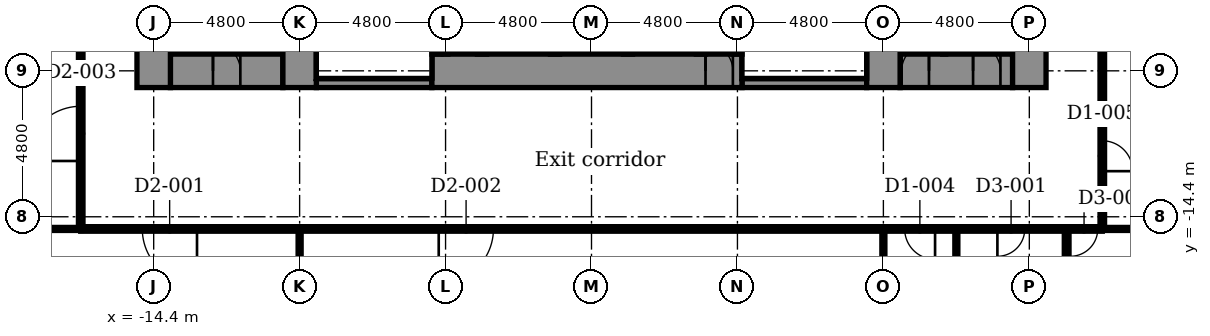
"""IFC4 building model, lengths in metres.
Left out: names, types, materials, properties, quantities, classifications, styles, units other than length and angle.
Written with IfcOpenShell. Run it as: python <this file> out.ifc"""

import sys

from ifc_helpers import new_model, si_unit, direction, frame, frame_2d, origin, place, context, subcontext, project, spatial, rectangle, extrude, element, fill, save


model = new_model("IFC4")
c1 = context("Model", 3, precision=1e-05, world=origin(), true_north=direction((0.0, 1.0)))
c2 = subcontext(c1, "Body", "Model", "MODEL_VIEW")
j1 = project(units=[si_unit("LENGTHUNIT", "METRE"), si_unit("PLANEANGLEUNIT", "RADIAN")], contexts=[c1])
p1 = place(None, origin())
s1 = spatial("IfcSite", under=j1, at=p1, CompositionType="ELEMENT")
p2 = place(p1, origin())
s2 = spatial("IfcBuilding", under=s1, at=p2, CompositionType="ELEMENT")
p3 = place(p2, origin())
s3 = spatial("IfcBuildingStorey", under=s2, at=p3, CompositionType="ELEMENT", Elevation=0.0)
p4 = place(p3, frame((-9.05, -10.0, -0.4), z_axis=(0.0, 0.0, 1.0), x_axis=(1.0, 0.0, 0.0)))
e1 = element("IfcWall", 1, at=p4, inside=s3, PredefinedType="STANDARD", context=c2, shape_type="SweptSolid", body=[
    extrude(rectangle(XDim=3.8, YDim=0.3, at=frame_2d((1.9, 0.0))), origin(), (0.0, 0.0, 1.0), 7.1),
])
p5 = place(p3, frame((4.95, -10.0, -0.4), z_axis=(0.0, 0.0, 1.0), x_axis=(1.0, 0.0, 0.0)))
e2 = element("IfcWall", 2, at=p5, inside=s3, PredefinedType="STANDARD", context=c2, shape_type="SweptSolid", body=[
    extrude(rectangle(XDim=4.1, YDim=0.3, at=frame_2d((2.05, 0.0))), origin(), (0.0, 0.0, 1.0), 7.1),
])
p6 = place(p3, frame((-13.85, -9.6, -0.4), z_axis=(0.0, 0.0, 1.0), x_axis=(1.0, 0.0, 0.0)))
e3 = element("IfcWall", 3, at=p6, inside=s3, PredefinedType="SHEAR", context=c2, shape_type="SweptSolid", body=[
    extrude(rectangle(XDim=3.7, YDim=1.1, at=frame_2d((1.85, 0.0))), origin(), (0.0, 0.0, 1.0), 7.1),
])
p7 = place(p6, frame((1.4, 0.0, 0.4)))
e4 = element("IfcOpeningElement", 4, at=p7, cuts=e3, PredefinedType="OPENING", context=c2, shape_type="SweptSolid", body=[
    extrude(rectangle(XDim=0.9, YDim=2.1, at=frame_2d((0.45, 1.05))), frame((0.0, 0.56, 0.0), z_axis=(0.0, -1.0, 0.0), x_axis=(1.0, 0.0, 0.0)), (0.0, 0.0, 1.0), 1.12),
])
p8 = place(p3, frame((-5.25, -9.6, -0.4), z_axis=(0.0, 0.0, 1.0), x_axis=(1.0, 0.0, 0.0)))
e5 = element("IfcWall", 5, at=p8, inside=s3, PredefinedType="SHEAR", context=c2, shape_type="SweptSolid", body=[
    extrude(rectangle(XDim=10.2, YDim=1.1, at=frame_2d((5.1, 0.0))), origin(), (0.0, 0.0, 1.0), 7.1),
])
p9 = place(p8, frame((9.0, 0.0, 0.4)))
e6 = element("IfcOpeningElement", 6, at=p9, cuts=e5, PredefinedType="OPENING", context=c2, shape_type="SweptSolid", body=[
    extrude(rectangle(XDim=0.9, YDim=2.1, at=frame_2d((0.45, 1.05))), frame((0.0, 0.56, 0.0), z_axis=(0.0, -1.0, 0.0), x_axis=(1.0, 0.0, 0.0)), (0.0, 0.0, 1.0), 1.12),
])
p10 = place(p3, frame((10.15, -9.6, -0.4), z_axis=(0.0, 0.0, 1.0), x_axis=(1.0, 0.0, 0.0)))
e7 = element("IfcWall", 7, at=p10, inside=s3, PredefinedType="SHEAR", context=c2, shape_type="SweptSolid", body=[
    extrude(rectangle(XDim=3.7, YDim=1.1, at=frame_2d((1.85, 0.0))), origin(), (0.0, 0.0, 1.0), 7.1),
])
p11 = place(p10, frame((0.05, 0.0, 0.4)))
e8 = element("IfcOpeningElement", 8, at=p11, cuts=e7, PredefinedType="OPENING", context=c2, shape_type="SweptSolid", body=[
    extrude(rectangle(XDim=0.9, YDim=2.1, at=frame_2d((0.45, 1.05))), frame((0.0, 0.56, 0.0), z_axis=(0.0, -1.0, 0.0), x_axis=(1.0, 0.0, 0.0)), (0.0, 0.0, 1.0), 1.12),
])
p12 = place(p10, frame((2.4, 0.0, 0.4)))
e9 = element("IfcOpeningElement", 9, at=p12, cuts=e7, PredefinedType="OPENING", context=c2, shape_type="SweptSolid", body=[
    extrude(rectangle(XDim=0.9, YDim=2.1, at=frame_2d((0.45, 1.05))), frame((0.0, 0.56, 0.0), z_axis=(0.0, -1.0, 0.0), x_axis=(1.0, 0.0, 0.0)), (0.0, 0.0, 1.0), 1.12),
])
p13 = place(p3, frame((-14.4, -10.15, -0.4), z_axis=(0.0, 0.0, 1.0), x_axis=(0.0, 1.0, 0.0)))
e10 = element("IfcWall", 10, at=p13, inside=s3, PredefinedType="SHEAR", context=c2, shape_type="SweptSolid", body=[
    extrude(rectangle(XDim=20.3, YDim=1.1, at=frame_2d((10.15, 0.0))), origin(), (0.0, 0.0, 1.0), 7.1),
])
p14 = place(p13, frame((3.6, 0.0, 0.4)))
e11 = element("IfcOpeningElement", 11, at=p14, cuts=e10, PredefinedType="OPENING", context=c2, shape_type="SweptSolid", body=[
    extrude(rectangle(XDim=1.1, YDim=2.1, at=frame_2d((0.55, 1.05))), frame((0.0, 0.56, 0.0), z_axis=(0.0, -1.0, 0.0), x_axis=(1.0, 0.0, 0.0)), (0.0, 0.0, 1.0), 1.12),
])
p15 = place(p13, frame((6.0, 0.0, 0.4)))
e12 = element("IfcOpeningElement", 12, at=p15, cuts=e10, PredefinedType="OPENING", context=c2, shape_type="SweptSolid", body=[
    extrude(rectangle(XDim=1.1, YDim=2.1, at=frame_2d((0.55, 1.05))), frame((0.0, 0.56, 0.0), z_axis=(0.0, -1.0, 0.0), x_axis=(1.0, 0.0, 0.0)), (0.0, 0.0, 1.0), 1.12),
])
p16 = place(p13, frame((8.4, 0.0, 0.4)))
e13 = element("IfcOpeningElement", 13, at=p16, cuts=e10, PredefinedType="OPENING", context=c2, shape_type="SweptSolid", body=[
    extrude(rectangle(XDim=1.1, YDim=2.1, at=frame_2d((0.55, 1.05))), frame((0.0, 0.56, 0.0), z_axis=(0.0, -1.0, 0.0), x_axis=(1.0, 0.0, 0.0)), (0.0, 0.0, 1.0), 1.12),
])
p17 = place(p13, frame((10.8, 0.0, 0.4)))
e14 = element("IfcOpeningElement", 14, at=p17, cuts=e10, PredefinedType="OPENING", context=c2, shape_type="SweptSolid", body=[
    extrude(rectangle(XDim=1.1, YDim=2.1, at=frame_2d((0.55, 1.05))), frame((0.0, 0.56, 0.0), z_axis=(0.0, -1.0, 0.0), x_axis=(1.0, 0.0, 0.0)), (0.0, 0.0, 1.0), 1.12),
])
p18 = place(p13, frame((13.2, 0.0, 0.4)))
e15 = element("IfcOpeningElement", 15, at=p18, cuts=e10, PredefinedType="OPENING", context=c2, shape_type="SweptSolid", body=[
    extrude(rectangle(XDim=1.1, YDim=2.1, at=frame_2d((0.55, 1.05))), frame((0.0, 0.56, 0.0), z_axis=(0.0, -1.0, 0.0), x_axis=(1.0, 0.0, 0.0)), (0.0, 0.0, 1.0), 1.12),
])
p19 = place(p13, frame((15.6, 0.0, 0.4)))
e16 = element("IfcOpeningElement", 16, at=p19, cuts=e10, PredefinedType="OPENING", context=c2, shape_type="SweptSolid", body=[
    extrude(rectangle(XDim=1.1, YDim=2.1, at=frame_2d((0.55, 1.05))), frame((0.0, 0.56, 0.0), z_axis=(0.0, -1.0, 0.0), x_axis=(1.0, 0.0, 0.0)), (0.0, 0.0, 1.0), 1.12),
])
p20 = place(p3, frame((-9.6, -10.15, -0.4), z_axis=(0.0, 0.0, 1.0), x_axis=(0.0, 1.0, 0.0)))
e17 = element("IfcWall", 17, at=p20, inside=s3, PredefinedType="SHEAR", context=c2, shape_type="SweptSolid", body=[
    extrude(rectangle(XDim=7.6, YDim=1.1, at=frame_2d((3.8, 0.0))), origin(), (0.0, 0.0, 1.0), 7.1),
])
p21 = place(p3, frame((-5.1, -9.05, -0.4), z_axis=(0.0, 0.0, 1.0), x_axis=(0.0, 1.0, 0.0)))
e18 = element("IfcWall", 18, at=p21, inside=s3, PredefinedType="STANDARD", context=c2, shape_type="SweptSolid", body=[
    extrude(rectangle(XDim=6.8, YDim=0.3, at=frame_2d((3.4, 0.0))), origin(), (0.0, 0.0, 1.0), 7.1),
])
p22 = place(p21, frame((3.6, 0.0, 0.4)))
e19 = element("IfcOpeningElement", 19, at=p22, cuts=e18, PredefinedType="OPENING", context=c2, shape_type="SweptSolid", body=[
    extrude(rectangle(XDim=1.2, YDim=2.1, at=frame_2d((0.6, 1.05))), frame((0.0, 0.16, 0.0), z_axis=(0.0, -1.0, 0.0), x_axis=(1.0, 0.0, 0.0)), (0.0, 0.0, 1.0), 0.32),
])
for number, where, z_axis, x_axis in (
    (20, (-3.6, -9.05, -0.4), (0.0, 0.0, 1.0), (0.0, 1.0, 0.0)),
    (21, (-1.2, -9.05, -0.4), (0.0, 0.0, 1.0), (0.0, 1.0, 0.0)),
    (22, (1.2, -9.05, -0.4), (0.0, 0.0, 1.0), (0.0, 1.0, 0.0)),
    (23, (3.6, -9.05, -0.4), (0.0, 0.0, 1.0), (0.0, 1.0, 0.0)),
):
    element("IfcWall", number, at=place(p3, frame(where, z_axis=z_axis, x_axis=x_axis)), inside=s3, PredefinedType="STANDARD", context=c2, shape_type="SweptSolid", body=[
        extrude(rectangle(XDim=3.2, YDim=0.3, at=frame_2d((1.6, 0.0))), origin(), (0.0, 0.0, 1.0), 7.1),
    ])
p23 = place(p3, frame((4.8, -9.05, -0.4), z_axis=(0.0, 0.0, 1.0), x_axis=(0.0, 1.0, 0.0)))
e24 = element("IfcWall", 24, at=p23, inside=s3, PredefinedType="STANDARD", context=c2, shape_type="SweptSolid", body=[
    extrude(rectangle(XDim=6.8, YDim=0.3, at=frame_2d((3.4, 0.0))), origin(), (0.0, 0.0, 1.0), 7.1),
])
p24 = place(p23, frame((3.6, 0.0, 0.4)))
e25 = element("IfcOpeningElement", 25, at=p24, cuts=e24, PredefinedType="OPENING", context=c2, shape_type="SweptSolid", body=[
    extrude(rectangle(XDim=1.2, YDim=2.1, at=frame_2d((0.6, 1.05))), frame((0.0, 0.16, 0.0), z_axis=(0.0, -1.0, 0.0), x_axis=(1.0, 0.0, 0.0)), (0.0, 0.0, 1.0), 0.32),
])
p25 = place(p3, frame((9.6, -10.15, -0.4), z_axis=(0.0, 0.0, 1.0), x_axis=(0.0, 1.0, 0.0)))
e26 = element("IfcWall", 26, at=p25, inside=s3, PredefinedType="SHEAR", context=c2, shape_type="SweptSolid", body=[
    extrude(rectangle(XDim=20.3, YDim=1.1, at=frame_2d((10.15, 0.0))), origin(), (0.0, 0.0, 1.0), 7.1),
])
p26 = place(p3, frame((14.4, -10.15, -0.4), z_axis=(0.0, 0.0, 1.0), x_axis=(0.0, 1.0, 0.0)))
e27 = element("IfcWall", 27, at=p26, inside=s3, PredefinedType="SHEAR", context=c2, shape_type="SweptSolid", body=[
    extrude(rectangle(XDim=20.3, YDim=1.1, at=frame_2d((10.15, 0.0))), origin(), (0.0, 0.0, 1.0), 7.1),
])
p27 = place(p26, frame((3.6, 0.0, 0.4)))
e28 = element("IfcOpeningElement", 28, at=p27, cuts=e27, PredefinedType="OPENING", context=c2, shape_type="SweptSolid", body=[
    extrude(rectangle(XDim=1.1, YDim=2.1, at=frame_2d((0.55, 1.05))), frame((0.0, 0.56, 0.0), z_axis=(0.0, -1.0, 0.0), x_axis=(1.0, 0.0, 0.0)), (0.0, 0.0, 1.0), 1.12),
])
p28 = place(p26, frame((6.0, 0.0, 0.4)))
e29 = element("IfcOpeningElement", 29, at=p28, cuts=e27, PredefinedType="OPENING", context=c2, shape_type="SweptSolid", body=[
    extrude(rectangle(XDim=1.1, YDim=2.1, at=frame_2d((0.55, 1.05))), frame((0.0, 0.56, 0.0), z_axis=(0.0, -1.0, 0.0), x_axis=(1.0, 0.0, 0.0)), (0.0, 0.0, 1.0), 1.12),
])
p29 = place(p26, frame((8.4, 0.0, 0.4)))
e30 = element("IfcOpeningElement", 30, at=p29, cuts=e27, PredefinedType="OPENING", context=c2, shape_type="SweptSolid", body=[
    extrude(rectangle(XDim=1.1, YDim=2.1, at=frame_2d((0.55, 1.05))), frame((0.0, 0.56, 0.0), z_axis=(0.0, -1.0, 0.0), x_axis=(1.0, 0.0, 0.0)), (0.0, 0.0, 1.0), 1.12),
])
p30 = place(p26, frame((10.8, 0.0, 0.4)))
e31 = element("IfcOpeningElement", 31, at=p30, cuts=e27, PredefinedType="OPENING", context=c2, shape_type="SweptSolid", body=[
    extrude(rectangle(XDim=1.1, YDim=2.1, at=frame_2d((0.55, 1.05))), frame((0.0, 0.56, 0.0), z_axis=(0.0, -1.0, 0.0), x_axis=(1.0, 0.0, 0.0)), (0.0, 0.0, 1.0), 1.12),
])
p31 = place(p26, frame((13.2, 0.0, 0.4)))
e32 = element("IfcOpeningElement", 32, at=p31, cuts=e27, PredefinedType="OPENING", context=c2, shape_type="SweptSolid", body=[
    extrude(rectangle(XDim=1.1, YDim=2.1, at=frame_2d((0.55, 1.05))), frame((0.0, 0.56, 0.0), z_axis=(0.0, -1.0, 0.0), x_axis=(1.0, 0.0, 0.0)), (0.0, 0.0, 1.0), 1.12),
])
p32 = place(p26, frame((15.6, 0.0, 0.4)))
e33 = element("IfcOpeningElement", 33, at=p32, cuts=e27, PredefinedType="OPENING", context=c2, shape_type="SweptSolid", body=[
    extrude(rectangle(XDim=1.1, YDim=2.1, at=frame_2d((0.55, 1.05))), frame((0.0, 0.56, 0.0), z_axis=(0.0, -1.0, 0.0), x_axis=(1.0, 0.0, 0.0)), (0.0, 0.0, 1.0), 1.12),
])
p33 = place(p3, frame((16.8, -14.8, 0.0), z_axis=(0.0, 0.0, 1.0), x_axis=(0.0, 1.0, 0.0)))
e34 = element("IfcWall", 34, at=p33, inside=s3, PredefinedType="PARTITIONING", context=c2, shape_type="SweptSolid", body=[
    extrude(rectangle(XDim=10.85, YDim=0.15, at=frame_2d((5.425, 0.0))), origin(), (0.0, 0.0, 1.0), 6.7),
])
p34 = place(p33, frame((1.9, 0.0, 0.0)))
e35 = element("IfcOpeningElement", 35, at=p34, cuts=e34, PredefinedType="OPENING", context=c2, shape_type="SweptSolid", body=[
    extrude(rectangle(XDim=1.0, YDim=2.1, at=frame_2d((0.5, 1.05))), frame((0.0, 0.085, 0.0), z_axis=(0.0, -1.0, 0.0), x_axis=(1.0, 0.0, 0.0)), (0.0, 0.0, 1.0), 0.17),
])
p35 = place(p33, frame((8.9, 0.0, 0.0)))
e36 = element("IfcOpeningElement", 36, at=p35, cuts=e34, PredefinedType="OPENING", context=c2, shape_type="SweptSolid", body=[
    extrude(rectangle(XDim=1.0, YDim=2.1, at=frame_2d((0.5, 1.05))), frame((0.0, 0.085, 0.0), z_axis=(0.0, -1.0, 0.0), x_axis=(1.0, 0.0, 0.0)), (0.0, 0.0, 1.0), 0.17),
])
for number, where, z_axis, x_axis in (
    (37, (15.6, -19.6, 0.0), (0.0, 0.0, 1.0), (0.0, 1.0, 0.0)),
    (38, (12.0, -19.6, 0.0), (0.0, 0.0, 1.0), (0.0, 1.0, 0.0)),
):
    element("IfcWall", number, at=place(p3, frame(where, z_axis=z_axis, x_axis=x_axis)), inside=s3, PredefinedType="PARTITIONING", context=c2, shape_type="SweptSolid", body=[
        extrude(rectangle(XDim=4.8, YDim=0.1, at=frame_2d((2.4, 0.0))), origin(), (0.0, 0.0, 1.0), 6.7),
    ])
p36 = place(p3, frame((11.6, -9.05, 0.0), z_axis=(0.0, 0.0, 1.0), x_axis=(0.0, 1.0, 0.0)))
e39 = element("IfcWall", 39, at=p36, inside=s3, PredefinedType="PARTITIONING", context=c2, shape_type="SweptSolid", body=[
    extrude(rectangle(XDim=1.7, YDim=0.1, at=frame_2d((0.85, 0.0))), origin(), (0.0, 0.0, 1.0), 6.7),
])
p37 = place(p3, frame((9.6, -18.64, 0.0), z_axis=(0.0, 0.0, 1.0), x_axis=(0.0, 1.0, 0.0)))
e40 = element("IfcWall", 40, at=p37, inside=s3, PredefinedType="PARTITIONING", context=c2, shape_type="SweptSolid", body=[
    extrude(rectangle(XDim=3.84, YDim=0.1, at=frame_2d((1.92, 0.0))), origin(), (0.0, 0.0, 1.0), 6.293),
])
p38 = place(p3, frame((-4.8, -9.05, 0.0), z_axis=(0.0, 0.0, 1.0), x_axis=(0.0, 1.0, 0.0)))
e41 = element("IfcWall", 41, at=p38, inside=s3, PredefinedType="PARTITIONING", context=c2, shape_type="SweptSolid", body=[
    extrude(rectangle(XDim=3.05, YDim=0.15, at=frame_2d((1.525, 0.0))), origin(), (0.0, 0.0, 1.0), 6.7),
])
p39 = place(p3, frame((-9.6, -18.64, 0.0), z_axis=(0.0, 0.0, 1.0), x_axis=(0.0, 1.0, 0.0)))
e42 = element("IfcWall", 42, at=p39, inside=s3, PredefinedType="PARTITIONING", context=c2, shape_type="SweptSolid", body=[
    extrude(rectangle(XDim=3.84, YDim=0.1, at=frame_2d((1.92, 0.0))), origin(), (0.0, 0.0, 1.0), 6.293),
])
p40 = place(p3, frame((-16.8, -14.8, 0.0), z_axis=(0.0, 0.0, 1.0), x_axis=(0.0, 1.0, 0.0)))
e43 = element("IfcWall", 43, at=p40, inside=s3, PredefinedType="PARTITIONING", context=c2, shape_type="SweptSolid", body=[
    extrude(rectangle(XDim=10.85, YDim=0.15, at=frame_2d((5.425, 0.0))), origin(), (0.0, 0.0, 1.0), 6.7),
])
p41 = place(p40, frame((2.235, 0.0, 0.0)))
e44 = element("IfcOpeningElement", 44, at=p41, cuts=e43, PredefinedType="OPENING", context=c2, shape_type="SweptSolid", body=[
    extrude(rectangle(XDim=1.8, YDim=2.1, at=frame_2d((0.9, 1.05))), frame((0.0, 0.085, 0.0), z_axis=(0.0, -1.0, 0.0), x_axis=(1.0, 0.0, 0.0)), (0.0, 0.0, 1.0), 0.17),
])
p42 = place(p40, frame((8.6, 0.0, 0.0)))
e45 = element("IfcOpeningElement", 45, at=p42, cuts=e43, PredefinedType="OPENING", context=c2, shape_type="SweptSolid", body=[
    extrude(rectangle(XDim=1.0, YDim=2.1, at=frame_2d((0.5, 1.05))), frame((0.0, 0.085, 0.0), z_axis=(0.0, -1.0, 0.0), x_axis=(1.0, 0.0, 0.0)), (0.0, 0.0, 1.0), 0.17),
])
for number, where, z_axis, x_axis in (
    (46, (-21.6, -14.8, 0.0), (0.0, 0.0, 1.0), (1.0, 0.0, 0.0)),
    (47, (16.8, -14.8, 0.0), (0.0, 0.0, 1.0), (1.0, 0.0, 0.0)),
):
    element("IfcWall", number, at=place(p3, frame(where, z_axis=z_axis, x_axis=x_axis)), inside=s3, PredefinedType="PARTITIONING", context=c2, shape_type="SweptSolid", body=[
        extrude(rectangle(XDim=4.8, YDim=0.1, at=frame_2d((2.4, 0.0))), origin(), (0.0, 0.0, 1.0), 6.7),
    ])
p43 = place(p3, frame((-16.8, -14.8, 0.0), z_axis=(0.0, 0.0, 1.0), x_axis=(1.0, 0.0, 0.0)))
e48 = element("IfcWall", 48, at=p43, inside=s3, PredefinedType="PARTITIONING", context=c2, shape_type="SweptSolid", body=[
    extrude(rectangle(XDim=33.6, YDim=0.15, at=frame_2d((16.8, 0.0))), origin(), (0.0, 0.0, 1.0), 6.7),
])
p44 = place(p43, frame((30.15, 0.0, 0.0)))
e49 = element("IfcOpeningElement", 49, at=p44, cuts=e48, PredefinedType="OPENING", context=c2, shape_type="SweptSolid", body=[
    extrude(rectangle(XDim=0.9, YDim=2.1, at=frame_2d((0.45, 1.05))), frame((0.0, 0.085, 0.0), z_axis=(0.0, -1.0, 0.0), x_axis=(1.0, 0.0, 0.0)), (0.0, 0.0, 1.0), 0.17),
])
p45 = place(p43, frame((32.55, 0.0, 0.0)))
e50 = element("IfcOpeningElement", 50, at=p45, cuts=e48, PredefinedType="OPENING", context=c2, shape_type="SweptSolid", body=[
    extrude(rectangle(XDim=0.9, YDim=2.1, at=frame_2d((0.45, 1.05))), frame((0.0, 0.085, 0.0), z_axis=(0.0, -1.0, 0.0), x_axis=(1.0, 0.0, 0.0)), (0.0, 0.0, 1.0), 0.17),
])
p46 = place(p43, frame((2.025, 0.0, 0.0)))
e51 = element("IfcOpeningElement", 51, at=p46, cuts=e48, PredefinedType="OPENING", context=c2, shape_type="SweptSolid", body=[
    extrude(rectangle(XDim=1.8, YDim=2.1, at=frame_2d((0.9, 1.05))), frame((0.0, 0.085, 0.0), z_axis=(0.0, -1.0, 0.0), x_axis=(1.0, 0.0, 0.0)), (0.0, 0.0, 1.0), 0.17),
])
p47 = place(p43, frame((11.775, 0.0, 0.0)))
e52 = element("IfcOpeningElement", 52, at=p47, cuts=e48, PredefinedType="OPENING", context=c2, shape_type="SweptSolid", body=[
    extrude(rectangle(XDim=1.8, YDim=2.1, at=frame_2d((0.9, 1.05))), frame((0.0, 0.085, 0.0), z_axis=(0.0, -1.0, 0.0), x_axis=(1.0, 0.0, 0.0)), (0.0, 0.0, 1.0), 0.17),
])
p48 = place(p43, frame((27.1, 0.0, 0.0)))
e53 = element("IfcOpeningElement", 53, at=p48, cuts=e48, PredefinedType="OPENING", context=c2, shape_type="SweptSolid", body=[
    extrude(rectangle(XDim=1.0, YDim=2.1, at=frame_2d((0.5, 1.05))), frame((0.0, 0.085, 0.0), z_axis=(0.0, -1.0, 0.0), x_axis=(1.0, 0.0, 0.0)), (0.0, 0.0, 1.0), 0.17),
])
p49 = place(p44, frame((0.9, 0.0, 0.0), z_axis=(0.0, 0.0, 1.0), x_axis=(-1.0, 0.0, 0.0)))
e54 = element("IfcDoor", 54, at=p49, inside=s3, OperationType="SINGLE_SWING_LEFT", PredefinedType="DOOR", context=c2, shape_type="SweptSolid", body=[
    extrude(rectangle(XDim=0.9, YDim=2.1, at=frame_2d((0.45, 1.05))), frame((0.0, 0.025, 0.0), z_axis=(0.0, -1.0, 0.0), x_axis=(1.0, 0.0, 0.0)), (0.0, 0.0, 1.0), 0.05),
])
fill(e49, e54)
p50 = place(p45, frame((0.9, 0.0, 0.0), z_axis=(0.0, 0.0, 1.0), x_axis=(-1.0, 0.0, 0.0)))
e55 = element("IfcDoor", 55, at=p50, inside=s3, OperationType="SINGLE_SWING_LEFT", PredefinedType="DOOR", context=c2, shape_type="SweptSolid", body=[
    extrude(rectangle(XDim=0.9, YDim=2.1, at=frame_2d((0.45, 1.05))), frame((0.0, 0.025, 0.0), z_axis=(0.0, -1.0, 0.0), x_axis=(1.0, 0.0, 0.0)), (0.0, 0.0, 1.0), 0.05),
])
fill(e50, e55)
p51 = place(p46, frame((1.8, 0.0, 0.0), z_axis=(0.0, 0.0, 1.0), x_axis=(-1.0, 0.0, 0.0)))
e56 = element("IfcDoor", 56, at=p51, inside=s3, OperationType="SINGLE_SWING_RIGHT", PredefinedType="DOOR", context=c2, shape_type="SweptSolid", body=[
    extrude(rectangle(XDim=1.8, YDim=2.1, at=frame_2d((0.9, 1.05))), frame((0.0, 0.025, 0.0), z_axis=(0.0, -1.0, 0.0), x_axis=(1.0, 0.0, 0.0)), (0.0, 0.0, 1.0), 0.05),
])
fill(e51, e56)
p52 = place(p47, frame((1.8, 0.0, 0.0), z_axis=(0.0, 0.0, 1.0), x_axis=(-1.0, 0.0, 0.0)))
e57 = element("IfcDoor", 57, at=p52, inside=s3, OperationType="SINGLE_SWING_LEFT", PredefinedType="DOOR", context=c2, shape_type="SweptSolid", body=[
    extrude(rectangle(XDim=1.8, YDim=2.1, at=frame_2d((0.9, 1.05))), frame((0.0, 0.025, 0.0), z_axis=(0.0, -1.0, 0.0), x_axis=(1.0, 0.0, 0.0)), (0.0, 0.0, 1.0), 0.05),
])
fill(e52, e57)
p53 = place(p48, frame((1.0, 0.0, 0.0), z_axis=(0.0, 0.0, 1.0), x_axis=(-1.0, 0.0, 0.0)))
e58 = element("IfcDoor", 58, at=p53, inside=s3, OperationType="SINGLE_SWING_RIGHT", PredefinedType="DOOR", context=c2, shape_type="SweptSolid", body=[
    extrude(rectangle(XDim=1.0, YDim=2.1, at=frame_2d((0.5, 1.05))), frame((0.0, 0.025, 0.0), z_axis=(0.0, -1.0, 0.0), x_axis=(1.0, 0.0, 0.0)), (0.0, 0.0, 1.0), 0.05),
])
fill(e53, e58)
p54 = place(p34, frame((1.0, 0.0, 0.0), z_axis=(0.0, 0.0, 1.0), x_axis=(-1.0, 0.0, 0.0)))
e59 = element("IfcDoor", 59, at=p54, inside=s3, OperationType="SINGLE_SWING_LEFT", PredefinedType="DOOR", context=c2, shape_type="SweptSolid", body=[
    extrude(rectangle(XDim=1.0, YDim=2.1, at=frame_2d((0.5, 1.05))), frame((0.0, 0.025, 0.0), z_axis=(0.0, -1.0, 0.0), x_axis=(1.0, 0.0, 0.0)), (0.0, 0.0, 1.0), 0.05),
])
fill(e35, e59)
p55 = place(p41, origin())
e60 = element("IfcDoor", 60, at=p55, inside=s3, OperationType="SINGLE_SWING_LEFT", PredefinedType="DOOR", context=c2, shape_type="SweptSolid", body=[
    extrude(rectangle(XDim=1.8, YDim=2.1, at=frame_2d((0.9, 1.05))), frame((0.0, 0.025, 0.0), z_axis=(0.0, -1.0, 0.0), x_axis=(1.0, 0.0, 0.0)), (0.0, 0.0, 1.0), 0.05),
])
fill(e44, e60)
p56 = place(p11, origin())
e61 = element("IfcDoor", 61, at=p56, inside=s3, OperationType="SINGLE_SWING_RIGHT", PredefinedType="DOOR", context=c2, shape_type="SweptSolid", body=[
    extrude(rectangle(XDim=0.9, YDim=2.1, at=frame_2d((0.45, 1.05))), frame((0.0, 0.025, 0.0), z_axis=(0.0, -1.0, 0.0), x_axis=(1.0, 0.0, 0.0)), (0.0, 0.0, 1.0), 0.05),
])
fill(e8, e61)
p57 = place(p12, origin())
e62 = element("IfcDoor", 62, at=p57, inside=s3, OperationType="SINGLE_SWING_LEFT", PredefinedType="DOOR", context=c2, shape_type="SweptSolid", body=[
    extrude(rectangle(XDim=0.9, YDim=2.1, at=frame_2d((0.45, 1.05))), frame((0.0, 0.025, 0.0), z_axis=(0.0, -1.0, 0.0), x_axis=(1.0, 0.0, 0.0)), (0.0, 0.0, 1.0), 0.05),
])
fill(e9, e62)
p58 = place(p7, origin())
e63 = element("IfcDoor", 63, at=p58, inside=s3, OperationType="SINGLE_SWING_LEFT", PredefinedType="DOOR", context=c2, shape_type="SweptSolid", body=[
    extrude(rectangle(XDim=0.9, YDim=2.1, at=frame_2d((0.45, 1.05))), frame((0.0, 0.025, 0.0), z_axis=(0.0, -1.0, 0.0), x_axis=(1.0, 0.0, 0.0)), (0.0, 0.0, 1.0), 0.05),
])
fill(e4, e63)
p59 = place(p9, origin())
e64 = element("IfcDoor", 64, at=p59, inside=s3, OperationType="SINGLE_SWING_LEFT", PredefinedType="DOOR", context=c2, shape_type="SweptSolid", body=[
    extrude(rectangle(XDim=0.9, YDim=2.1, at=frame_2d((0.45, 1.05))), frame((0.0, 0.025, 0.0), z_axis=(0.0, -1.0, 0.0), x_axis=(1.0, 0.0, 0.0)), (0.0, 0.0, 1.0), 0.05),
])
fill(e6, e64)
save(model, sys.argv[1])
